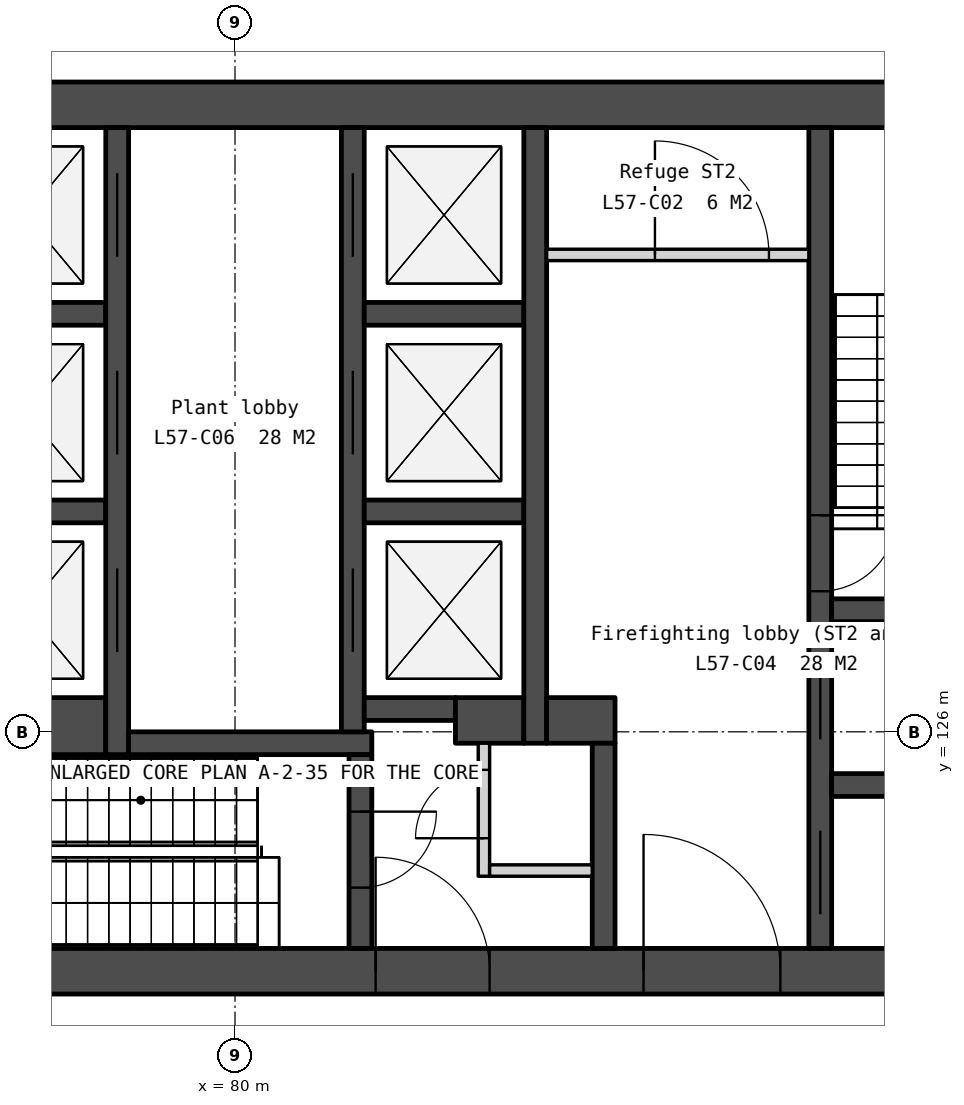
"""IFC4 building model, lengths in metres.
Left out: names, types, materials, properties, quantities, classifications, styles, units other than length and angle.
Written with IfcOpenShell. Run it as: python <this file> out.ifc"""

import sys

from ifc_helpers import new_model, si_unit, direction, frame, frame_2d, origin, place, context, subcontext, project, spatial, rectangle, extrude, element, fill, save


model = new_model("IFC4")
c1 = context("Model", 3, precision=1e-05, world=origin(), true_north=direction((0.0, 1.0)))
c2 = subcontext(c1, "Body", "Model", "MODEL_VIEW")
j1 = project(units=[si_unit("LENGTHUNIT", "METRE"), si_unit("PLANEANGLEUNIT", "RADIAN")], contexts=[c1])
p1 = place(None, origin())
s1 = spatial("IfcSite", under=j1, at=p1, CompositionType="ELEMENT")
p2 = place(p1, origin())
s2 = spatial("IfcBuilding", under=s1, at=p2, CompositionType="ELEMENT")
p3 = place(p2, frame((0.0, 0.0, 227.0)))
s3 = spatial("IfcBuildingStorey", under=s2, at=p3, CompositionType="ELEMENT", Elevation=227.0)
p4 = place(p3, frame((69.0, 134.25, 0.0), z_axis=(0.0, 0.0, 1.0), x_axis=(1.0, 0.0, 0.0)))
e1 = element("IfcWall", 1, at=p4, inside=s3, PredefinedType="SOLIDWALL", context=c2, shape_type="SweptSolid", body=[
    extrude(rectangle(XDim=22.0, YDim=0.6, at=frame_2d((11.0, 0.0))), origin(), (0.0, 0.0, 1.0), 11.25),
])
p5 = place(p3, frame((69.0, 122.85, 0.0), z_axis=(0.0, 0.0, 1.0), x_axis=(1.0, 0.0, 0.0)))
e2 = element("IfcWall", 2, at=p5, inside=s3, PredefinedType="SOLIDWALL", context=c2, shape_type="SweptSolid", body=[
    extrude(rectangle(XDim=22.0, YDim=0.6, at=frame_2d((11.0, 0.0))), origin(), (0.0, 0.0, 1.0), 11.25),
])
p6 = place(p5, frame((16.375, 0.0, 0.0)))
e3 = element("IfcOpeningElement", 3, at=p6, cuts=e2, PredefinedType="OPENING", context=c2, shape_type="SweptSolid", body=[
    extrude(rectangle(XDim=1.8, YDim=2.1, at=frame_2d((0.9, 1.05))), frame((0.0, 0.31, 0.0), z_axis=(0.0, -1.0, 0.0), x_axis=(1.0, 0.0, 0.0)), (0.0, 0.0, 1.0), 0.62),
])
p7 = place(p5, frame((3.825, 0.0, 0.0)))
e4 = element("IfcOpeningElement", 4, at=p7, cuts=e2, PredefinedType="OPENING", context=c2, shape_type="SweptSolid", body=[
    extrude(rectangle(XDim=1.8, YDim=2.1, at=frame_2d((0.9, 1.05))), frame((0.0, 0.31, 0.0), z_axis=(0.0, -1.0, 0.0), x_axis=(1.0, 0.0, 0.0)), (0.0, 0.0, 1.0), 0.62),
])
p8 = place(p5, frame((12.85, 0.0, 0.0)))
e5 = element("IfcOpeningElement", 5, at=p8, cuts=e2, PredefinedType="OPENING", context=c2, shape_type="SweptSolid", body=[
    extrude(rectangle(XDim=1.5, YDim=2.1, at=frame_2d((0.75, 1.05))), frame((0.0, 0.31, 0.0), z_axis=(0.0, -1.0, 0.0), x_axis=(1.0, 0.0, 0.0)), (0.0, 0.0, 1.0), 0.62),
])
for number, where, z_axis, x_axis in (
    (6, (76.2, 131.5, 0.0), (0.0, 0.0, 1.0), (1.0, 0.0, 0.0)),
    (7, (76.2, 128.9, 0.0), (0.0, 0.0, 1.0), (1.0, 0.0, 0.0)),
):
    element("IfcWall", number, at=place(p3, frame(where, z_axis=z_axis, x_axis=x_axis)), inside=s3, PredefinedType="SOLIDWALL", context=c2, shape_type="SweptSolid", body=[
        extrude(rectangle(XDim=2.1, YDim=0.3, at=frame_2d((1.05, 0.0))), origin(), (0.0, 0.0, 1.0), 11.25),
    ])
p9 = place(p3, frame((76.2, 126.075, 0.0), z_axis=(0.0, 0.0, 1.0), x_axis=(1.0, 0.0, 0.0)))
e8 = element("IfcWall", 8, at=p9, inside=s3, PredefinedType="SOLIDWALL", context=c2, shape_type="SweptSolid", body=[
    extrude(rectangle(XDim=2.1, YDim=0.75, at=frame_2d((1.05, 0.0))), origin(), (0.0, 0.0, 1.0), 11.25),
])
p10 = place(p3, frame((78.45, 133.95, 0.0), z_axis=(0.0, 0.0, 1.0), x_axis=(0.0, -1.0, 0.0)))
e9 = element("IfcWall", 9, at=p10, inside=s3, PredefinedType="SOLIDWALL", context=c2, shape_type="SweptSolid", body=[
    extrude(rectangle(XDim=8.25, YDim=0.3, at=frame_2d((4.125, 0.0))), origin(), (0.0, 0.0, 1.0), 11.25),
])
p11 = place(p10, frame((0.6, 0.0, 0.0)))
e10 = element("IfcOpeningElement", 10, at=p11, cuts=e9, PredefinedType="OPENING", context=c2, shape_type="SweptSolid", body=[
    extrude(rectangle(XDim=1.1, YDim=2.1, at=frame_2d((0.55, 1.05))), frame((0.0, 0.16, 0.0), z_axis=(0.0, -1.0, 0.0), x_axis=(1.0, 0.0, 0.0)), (0.0, 0.0, 1.0), 0.32),
])
p12 = place(p10, frame((3.2, 0.0, 0.0)))
e11 = element("IfcOpeningElement", 11, at=p12, cuts=e9, PredefinedType="OPENING", context=c2, shape_type="SweptSolid", body=[
    extrude(rectangle(XDim=1.1, YDim=2.1, at=frame_2d((0.55, 1.05))), frame((0.0, 0.16, 0.0), z_axis=(0.0, -1.0, 0.0), x_axis=(1.0, 0.0, 0.0)), (0.0, 0.0, 1.0), 0.32),
])
p13 = place(p10, frame((5.8, 0.0, 0.0)))
e12 = element("IfcOpeningElement", 12, at=p13, cuts=e9, PredefinedType="OPENING", context=c2, shape_type="SweptSolid", body=[
    extrude(rectangle(XDim=1.1, YDim=2.1, at=frame_2d((0.55, 1.05))), frame((0.0, 0.16, 0.0), z_axis=(0.0, -1.0, 0.0), x_axis=(1.0, 0.0, 0.0)), (0.0, 0.0, 1.0), 0.32),
])
p14 = place(p3, frame((78.6, 125.85, 0.0), z_axis=(0.0, 0.0, 1.0), x_axis=(1.0, 0.0, 0.0)))
e13 = element("IfcWall", 13, at=p14, inside=s3, PredefinedType="SOLIDWALL", context=c2, shape_type="SweptSolid", body=[
    extrude(rectangle(XDim=3.2, YDim=0.3, at=frame_2d((1.6, 0.0))), origin(), (0.0, 0.0, 1.0), 11.25),
])
p15 = place(p3, frame((81.55, 133.95, 0.0), z_axis=(0.0, 0.0, 1.0), x_axis=(0.0, -1.0, 0.0)))
e14 = element("IfcWall", 14, at=p15, inside=s3, PredefinedType="SOLIDWALL", context=c2, shape_type="SweptSolid", body=[
    extrude(rectangle(XDim=7.95, YDim=0.3, at=frame_2d((3.975, 0.0))), origin(), (0.0, 0.0, 1.0), 11.25),
])
p16 = place(p15, frame((0.6, 0.0, 0.0)))
e15 = element("IfcOpeningElement", 15, at=p16, cuts=e14, PredefinedType="OPENING", context=c2, shape_type="SweptSolid", body=[
    extrude(rectangle(XDim=1.1, YDim=2.1, at=frame_2d((0.55, 1.05))), frame((0.0, 0.16, 0.0), z_axis=(0.0, -1.0, 0.0), x_axis=(1.0, 0.0, 0.0)), (0.0, 0.0, 1.0), 0.32),
])
p17 = place(p15, frame((3.2, 0.0, 0.0)))
e16 = element("IfcOpeningElement", 16, at=p17, cuts=e14, PredefinedType="OPENING", context=c2, shape_type="SweptSolid", body=[
    extrude(rectangle(XDim=1.1, YDim=2.1, at=frame_2d((0.55, 1.05))), frame((0.0, 0.16, 0.0), z_axis=(0.0, -1.0, 0.0), x_axis=(1.0, 0.0, 0.0)), (0.0, 0.0, 1.0), 0.32),
])
p18 = place(p15, frame((5.8, 0.0, 0.0)))
e17 = element("IfcOpeningElement", 17, at=p18, cuts=e14, PredefinedType="OPENING", context=c2, shape_type="SweptSolid", body=[
    extrude(rectangle(XDim=1.1, YDim=2.1, at=frame_2d((0.55, 1.05))), frame((0.0, 0.16, 0.0), z_axis=(0.0, -1.0, 0.0), x_axis=(1.0, 0.0, 0.0)), (0.0, 0.0, 1.0), 0.32),
])
p19 = place(p3, frame((81.65, 125.7, 0.0), z_axis=(0.0, 0.0, 1.0), x_axis=(0.0, -1.0, 0.0)))
e18 = element("IfcWall", 18, at=p19, inside=s3, PredefinedType="SOLIDWALL", context=c2, shape_type="SweptSolid", body=[
    extrude(rectangle(XDim=2.55, YDim=0.3, at=frame_2d((1.275, 0.0))), origin(), (0.0, 0.0, 1.0), 11.25),
])
p20 = place(p19, frame((0.75, 0.0, 0.0)))
e19 = element("IfcOpeningElement", 19, at=p20, cuts=e18, PredefinedType="OPENING", context=c2, shape_type="SweptSolid", body=[
    extrude(rectangle(XDim=1.0, YDim=2.1, at=frame_2d((0.5, 1.05))), frame((0.0, 0.16, 0.0), z_axis=(0.0, -1.0, 0.0), x_axis=(1.0, 0.0, 0.0)), (0.0, 0.0, 1.0), 0.32),
])
for number, where, z_axis, x_axis in (
    (20, (81.7, 131.5, 0.0), (0.0, 0.0, 1.0), (1.0, 0.0, 0.0)),
    (21, (81.7, 128.9, 0.0), (0.0, 0.0, 1.0), (1.0, 0.0, 0.0)),
):
    element("IfcWall", number, at=place(p3, frame(where, z_axis=z_axis, x_axis=x_axis)), inside=s3, PredefinedType="SOLIDWALL", context=c2, shape_type="SweptSolid", body=[
        extrude(rectangle(XDim=2.1, YDim=0.3, at=frame_2d((1.05, 0.0))), origin(), (0.0, 0.0, 1.0), 11.25),
    ])
p21 = place(p3, frame((81.7, 126.3, 0.0), z_axis=(0.0, 0.0, 1.0), x_axis=(1.0, 0.0, 0.0)))
e22 = element("IfcWall", 22, at=p21, inside=s3, PredefinedType="SOLIDWALL", context=c2, shape_type="SweptSolid", body=[
    extrude(rectangle(XDim=1.2, YDim=0.3, at=frame_2d((0.6, 0.0))), origin(), (0.0, 0.0, 1.0), 11.25),
])
p22 = place(p3, frame((82.9, 126.15, 0.0), z_axis=(0.0, 0.0, 1.0), x_axis=(1.0, 0.0, 0.0)))
e23 = element("IfcWall", 23, at=p22, inside=s3, PredefinedType="SOLIDWALL", context=c2, shape_type="SweptSolid", body=[
    extrude(rectangle(XDim=0.9, YDim=0.6, at=frame_2d((0.45, 0.0))), origin(), (0.0, 0.0, 1.0), 11.25),
])
p23 = place(p3, frame((83.275, 125.85, 0.0), z_axis=(0.0, 0.0, 1.0), x_axis=(0.0, -1.0, 0.0)))
e24 = element("IfcWall", 24, at=p23, inside=s3, PredefinedType="PARTITIONING", context=c2, shape_type="SweptSolid", body=[
    extrude(rectangle(XDim=1.75, YDim=0.15, at=frame_2d((0.875, 0.0))), origin(), (0.0, 0.0, 1.0), 11.25),
])
p24 = place(p23, frame((0.35, 0.0, 0.0)))
e25 = element("IfcOpeningElement", 25, at=p24, cuts=e24, PredefinedType="OPENING", context=c2, shape_type="SweptSolid", body=[
    extrude(rectangle(XDim=0.9, YDim=2.1, at=frame_2d((0.45, 1.05))), frame((0.0, 0.085, 0.0), z_axis=(0.0, -1.0, 0.0), x_axis=(1.0, 0.0, 0.0)), (0.0, 0.0, 1.0), 0.17),
])
p25 = place(p3, frame((83.35, 124.175, 0.0), z_axis=(0.0, 0.0, 1.0), x_axis=(1.0, 0.0, 0.0)))
e26 = element("IfcWall", 26, at=p25, inside=s3, PredefinedType="PARTITIONING", context=c2, shape_type="SweptSolid", body=[
    extrude(rectangle(XDim=1.35, YDim=0.15, at=frame_2d((0.675, 0.0))), origin(), (0.0, 0.0, 1.0), 11.25),
])
p26 = place(p3, frame((83.95, 133.95, 0.0), z_axis=(0.0, 0.0, 1.0), x_axis=(0.0, -1.0, 0.0)))
e27 = element("IfcWall", 27, at=p26, inside=s3, PredefinedType="SOLIDWALL", context=c2, shape_type="SweptSolid", body=[
    extrude(rectangle(XDim=8.1, YDim=0.3, at=frame_2d((4.05, 0.0))), origin(), (0.0, 0.0, 1.0), 11.25),
])
p27 = place(p3, frame((84.1, 132.275, 0.0), z_axis=(0.0, 0.0, 1.0), x_axis=(1.0, 0.0, 0.0)))
e28 = element("IfcWall", 28, at=p27, inside=s3, PredefinedType="PARTITIONING", context=c2, shape_type="SweptSolid", body=[
    extrude(rectangle(XDim=3.45, YDim=0.15, at=frame_2d((1.725, 0.0))), origin(), (0.0, 0.0, 1.0), 11.25),
])
p28 = place(p27, frame((1.425, 0.0, 0.0)))
e29 = element("IfcOpeningElement", 29, at=p28, cuts=e28, PredefinedType="OPENING", context=c2, shape_type="SweptSolid", body=[
    extrude(rectangle(XDim=1.5, YDim=2.1, at=frame_2d((0.75, 1.05))), frame((0.0, 0.085, 0.0), z_axis=(0.0, -1.0, 0.0), x_axis=(1.0, 0.0, 0.0)), (0.0, 0.0, 1.0), 0.17),
])
p29 = place(p3, frame((84.1, 126.15, 0.0), z_axis=(0.0, 0.0, 1.0), x_axis=(1.0, 0.0, 0.0)))
e30 = element("IfcWall", 30, at=p29, inside=s3, PredefinedType="SOLIDWALL", context=c2, shape_type="SweptSolid", body=[
    extrude(rectangle(XDim=0.9, YDim=0.6, at=frame_2d((0.45, 0.0))), origin(), (0.0, 0.0, 1.0), 11.25),
])
p30 = place(p3, frame((84.85, 125.85, 0.0), z_axis=(0.0, 0.0, 1.0), x_axis=(0.0, -1.0, 0.0)))
e31 = element("IfcWall", 31, at=p30, inside=s3, PredefinedType="SOLIDWALL", context=c2, shape_type="SweptSolid", body=[
    extrude(rectangle(XDim=2.7, YDim=0.3, at=frame_2d((1.35, 0.0))), origin(), (0.0, 0.0, 1.0), 11.25),
])
p31 = place(p3, frame((87.7, 133.95, 0.0), z_axis=(0.0, 0.0, 1.0), x_axis=(0.0, -1.0, 0.0)))
e32 = element("IfcWall", 32, at=p31, inside=s3, PredefinedType="SOLIDWALL", context=c2, shape_type="SweptSolid", body=[
    extrude(rectangle(XDim=10.8, YDim=0.3, at=frame_2d((5.4, 0.0))), origin(), (0.0, 0.0, 1.0), 11.25),
])
p32 = place(p31, frame((6.95, 0.0, 0.0)))
e33 = element("IfcOpeningElement", 33, at=p32, cuts=e32, PredefinedType="OPENING", context=c2, shape_type="SweptSolid", body=[
    extrude(rectangle(XDim=1.1, YDim=2.1, at=frame_2d((0.55, 1.05))), frame((0.0, 0.16, 0.0), z_axis=(0.0, -1.0, 0.0), x_axis=(1.0, 0.0, 0.0)), (0.0, 0.0, 1.0), 0.32),
])
p33 = place(p31, frame((5.1, 0.0, 0.0)))
e34 = element("IfcOpeningElement", 34, at=p33, cuts=e32, PredefinedType="OPENING", context=c2, shape_type="SweptSolid", body=[
    extrude(rectangle(XDim=1.0, YDim=2.1, at=frame_2d((0.5, 1.05))), frame((0.0, 0.16, 0.0), z_axis=(0.0, -1.0, 0.0), x_axis=(1.0, 0.0, 0.0)), (0.0, 0.0, 1.0), 0.32),
])
p34 = place(p31, frame((9.25, 0.0, 0.0)))
e35 = element("IfcOpeningElement", 35, at=p34, cuts=e32, PredefinedType="OPENING", context=c2, shape_type="SweptSolid", body=[
    extrude(rectangle(XDim=1.1, YDim=2.1, at=frame_2d((0.55, 1.05))), frame((0.0, 0.16, 0.0), z_axis=(0.0, -1.0, 0.0), x_axis=(1.0, 0.0, 0.0)), (0.0, 0.0, 1.0), 0.32),
])
for number, where, z_axis, x_axis in (
    (36, (87.85, 127.6, 0.0), (0.0, 0.0, 1.0), (1.0, 0.0, 0.0)),
    (37, (87.85, 125.3, 0.0), (0.0, 0.0, 1.0), (1.0, 0.0, 0.0)),
):
    element("IfcWall", number, at=place(p3, frame(where, z_axis=z_axis, x_axis=x_axis)), inside=s3, PredefinedType="SOLIDWALL", context=c2, shape_type="SweptSolid", body=[
        extrude(rectangle(XDim=2.55, YDim=0.3, at=frame_2d((1.275, 0.0))), origin(), (0.0, 0.0, 1.0), 11.25),
    ])
p35 = place(p11, origin())
e38 = element("IfcDoor", 38, at=p35, inside=s3, OperationType="SLIDING_TO_RIGHT", PredefinedType="DOOR", context=c2, shape_type="SweptSolid", body=[
    extrude(rectangle(XDim=1.1, YDim=2.1, at=frame_2d((0.55, 1.05))), frame((0.0, 0.025, 0.0), z_axis=(0.0, -1.0, 0.0), x_axis=(1.0, 0.0, 0.0)), (0.0, 0.0, 1.0), 0.05),
])
fill(e10, e38)
p36 = place(p12, origin())
e39 = element("IfcDoor", 39, at=p36, inside=s3, OperationType="SLIDING_TO_RIGHT", PredefinedType="DOOR", context=c2, shape_type="SweptSolid", body=[
    extrude(rectangle(XDim=1.1, YDim=2.1, at=frame_2d((0.55, 1.05))), frame((0.0, 0.025, 0.0), z_axis=(0.0, -1.0, 0.0), x_axis=(1.0, 0.0, 0.0)), (0.0, 0.0, 1.0), 0.05),
])
fill(e11, e39)
p37 = place(p13, origin())
e40 = element("IfcDoor", 40, at=p37, inside=s3, OperationType="SLIDING_TO_RIGHT", PredefinedType="DOOR", context=c2, shape_type="SweptSolid", body=[
    extrude(rectangle(XDim=1.1, YDim=2.1, at=frame_2d((0.55, 1.05))), frame((0.0, 0.025, 0.0), z_axis=(0.0, -1.0, 0.0), x_axis=(1.0, 0.0, 0.0)), (0.0, 0.0, 1.0), 0.05),
])
fill(e12, e40)
p38 = place(p16, origin())
e41 = element("IfcDoor", 41, at=p38, inside=s3, OperationType="SLIDING_TO_LEFT", PredefinedType="DOOR", context=c2, shape_type="SweptSolid", body=[
    extrude(rectangle(XDim=1.1, YDim=2.1, at=frame_2d((0.55, 1.05))), frame((0.0, 0.025, 0.0), z_axis=(0.0, -1.0, 0.0), x_axis=(1.0, 0.0, 0.0)), (0.0, 0.0, 1.0), 0.05),
])
fill(e15, e41)
p39 = place(p17, origin())
e42 = element("IfcDoor", 42, at=p39, inside=s3, OperationType="SLIDING_TO_LEFT", PredefinedType="DOOR", context=c2, shape_type="SweptSolid", body=[
    extrude(rectangle(XDim=1.1, YDim=2.1, at=frame_2d((0.55, 1.05))), frame((0.0, 0.025, 0.0), z_axis=(0.0, -1.0, 0.0), x_axis=(1.0, 0.0, 0.0)), (0.0, 0.0, 1.0), 0.05),
])
fill(e16, e42)
p40 = place(p18, origin())
e43 = element("IfcDoor", 43, at=p40, inside=s3, OperationType="SLIDING_TO_LEFT", PredefinedType="DOOR", context=c2, shape_type="SweptSolid", body=[
    extrude(rectangle(XDim=1.1, YDim=2.1, at=frame_2d((0.55, 1.05))), frame((0.0, 0.025, 0.0), z_axis=(0.0, -1.0, 0.0), x_axis=(1.0, 0.0, 0.0)), (0.0, 0.0, 1.0), 0.05),
])
fill(e17, e43)
p41 = place(p32, origin())
e44 = element("IfcDoor", 44, at=p41, inside=s3, OperationType="SLIDING_TO_LEFT", PredefinedType="DOOR", context=c2, shape_type="SweptSolid", body=[
    extrude(rectangle(XDim=1.1, YDim=2.1, at=frame_2d((0.55, 1.05))), frame((0.0, 0.025, 0.0), z_axis=(0.0, -1.0, 0.0), x_axis=(1.0, 0.0, 0.0)), (0.0, 0.0, 1.0), 0.05),
])
fill(e33, e44)
p42 = place(p6, origin())
e45 = element("IfcDoor", 45, at=p42, inside=s3, OperationType="DOUBLE_DOOR_DOUBLE_SWING", PredefinedType="DOOR", context=c2, shape_type="SweptSolid", body=[
    extrude(rectangle(XDim=1.8, YDim=2.1, at=frame_2d((0.9, 1.05))), frame((0.0, 0.025, 0.0), z_axis=(0.0, -1.0, 0.0), x_axis=(1.0, 0.0, 0.0)), (0.0, 0.0, 1.0), 0.05),
])
fill(e3, e45)
p43 = place(p8, origin())
e46 = element("IfcDoor", 46, at=p43, inside=s3, OperationType="DOUBLE_DOOR_DOUBLE_SWING", PredefinedType="DOOR", context=c2, shape_type="SweptSolid", body=[
    extrude(rectangle(XDim=1.5, YDim=2.1, at=frame_2d((0.75, 1.05))), frame((0.0, 0.025, 0.0), z_axis=(0.0, -1.0, 0.0), x_axis=(1.0, 0.0, 0.0)), (0.0, 0.0, 1.0), 0.05),
])
fill(e5, e46)
p44 = place(p24, origin())
e47 = element("IfcDoor", 47, at=p44, inside=s3, OperationType="SINGLE_SWING_RIGHT", PredefinedType="DOOR", context=c2, shape_type="SweptSolid", body=[
    extrude(rectangle(XDim=0.9, YDim=2.1, at=frame_2d((0.45, 1.05))), frame((0.0, 0.025, 0.0), z_axis=(0.0, -1.0, 0.0), x_axis=(1.0, 0.0, 0.0)), (0.0, 0.0, 1.0), 0.05),
])
fill(e25, e47)
p45 = place(p28, origin())
e48 = element("IfcDoor", 48, at=p45, inside=s3, OperationType="DOUBLE_DOOR_DOUBLE_SWING", PredefinedType="DOOR", context=c2, shape_type="SweptSolid", body=[
    extrude(rectangle(XDim=1.5, YDim=2.1, at=frame_2d((0.75, 1.05))), frame((0.0, 0.025, 0.0), z_axis=(0.0, -1.0, 0.0), x_axis=(1.0, 0.0, 0.0)), (0.0, 0.0, 1.0), 0.05),
])
fill(e29, e48)
p46 = place(p33, origin())
e49 = element("IfcDoor", 49, at=p46, inside=s3, OperationType="SINGLE_SWING_LEFT", PredefinedType="DOOR", context=c2, shape_type="SweptSolid", body=[
    extrude(rectangle(XDim=1.0, YDim=2.1, at=frame_2d((0.5, 1.05))), frame((0.0, 0.025, 0.0), z_axis=(0.0, -1.0, 0.0), x_axis=(1.0, 0.0, 0.0)), (0.0, 0.0, 1.0), 0.05),
])
fill(e34, e49)
p47 = place(p20, origin())
e50 = element("IfcDoor", 50, at=p47, inside=s3, OperationType="SINGLE_SWING_LEFT", PredefinedType="DOOR", context=c2, shape_type="SweptSolid", body=[
    extrude(rectangle(XDim=1.0, YDim=2.1, at=frame_2d((0.5, 1.05))), frame((0.0, 0.025, 0.0), z_axis=(0.0, -1.0, 0.0), x_axis=(1.0, 0.0, 0.0)), (0.0, 0.0, 1.0), 0.05),
])
fill(e19, e50)
p48 = place(p34, origin())
e51 = element("IfcDoor", 51, at=p48, inside=s3, OperationType="SLIDING_TO_LEFT", PredefinedType="DOOR", context=c2, shape_type="SweptSolid", body=[
    extrude(rectangle(XDim=1.1, YDim=2.1, at=frame_2d((0.55, 1.05))), frame((0.0, 0.025, 0.0), z_axis=(0.0, -1.0, 0.0), x_axis=(1.0, 0.0, 0.0)), (0.0, 0.0, 1.0), 0.05),
])
fill(e35, e51)
save(model, sys.argv[1])
